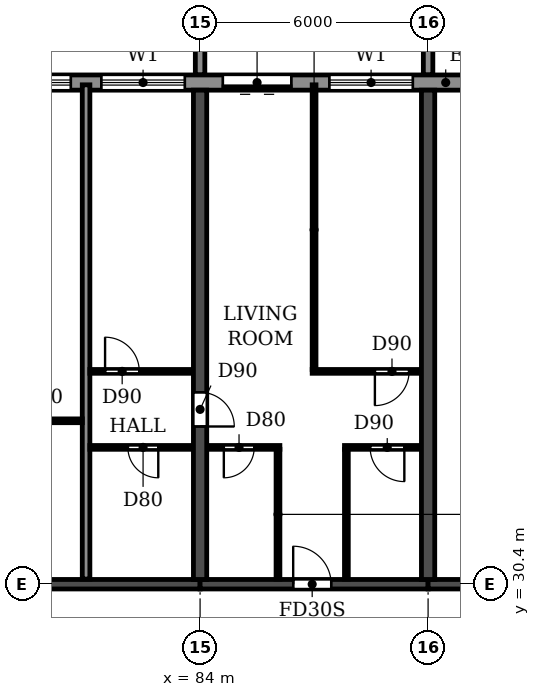
"""IFC4 building model, lengths in metres.
Left out: names, types, materials, properties, quantities, classifications, styles, units other than length and angle.
Written with IfcOpenShell. Run it as: python <this file> out.ifc"""

import sys

from ifc_helpers import new_model, si_unit, direction, frame, frame_2d, origin, place, context, subcontext, project, spatial, polyline, rectangle, outline, extrude, source, transform, mapped, element, fill, save


model = new_model("IFC4")
c1 = context("Model", 3, precision=1e-05, world=origin(), true_north=direction((0.0, 1.0)))
c2 = subcontext(c1, "Body", "Model", "MODEL_VIEW")
j1 = project(units=[si_unit("LENGTHUNIT", "METRE"), si_unit("PLANEANGLEUNIT", "RADIAN")], contexts=[c1])
p1 = place(None, origin())
s1 = spatial("IfcSite", under=j1, at=p1, CompositionType="ELEMENT")
p2 = place(p1, origin())
s2 = spatial("IfcBuilding", under=s1, at=p2, CompositionType="ELEMENT")
p3 = place(p2, frame((0.0, 0.0, 82.8)))
s3 = spatial("IfcBuildingStorey", under=s2, at=p3, CompositionType="ELEMENT", Elevation=82.8)
p4 = place(p3, frame((84.0, 30.525, 0.0), z_axis=(0.0, 0.0, 1.0), x_axis=(0.0, 1.0, 0.0)))
e1 = element("IfcWall", 1, at=p4, inside=s3, PredefinedType="SHEAR", context=c2, shape_type="SweptSolid", body=[
    extrude(rectangle(XDim=12.875, YDim=0.35, at=frame_2d((6.438, 0.0))), origin(), (0.0, 0.0, 1.0), 3.06),
])
p5 = place(p4, frame((4.025, 0.0, 0.0)))
e2 = element("IfcOpeningElement", 2, at=p5, cuts=e1, PredefinedType="OPENING", context=c2, shape_type="SweptSolid", body=[
    extrude(rectangle(XDim=0.9, YDim=2.1, at=frame_2d((0.45, 1.05))), frame((0.0, 0.185, 0.0), z_axis=(0.0, -1.0, 0.0), x_axis=(1.0, 0.0, 0.0)), (0.0, 0.0, 1.0), 0.37),
])
p6 = place(p3, frame((90.0, 30.525, 0.0), z_axis=(0.0, 0.0, 1.0), x_axis=(0.0, 1.0, 0.0)))
e3 = element("IfcWall", 3, at=p6, inside=s3, PredefinedType="SHEAR", context=c2, shape_type="SweptSolid", body=[
    extrude(rectangle(XDim=12.875, YDim=0.35, at=frame_2d((6.438, 0.0))), origin(), (0.0, 0.0, 1.0), 3.06),
])
p7 = place(p3, frame((78.0, 30.4, 0.0), z_axis=(0.0, 0.0, 1.0), x_axis=(1.0, 0.0, 0.0)))
e4 = element("IfcWall", 4, at=p7, inside=s3, PredefinedType="SHEAR", context=c2, shape_type="SweptSolid", body=[
    extrude(rectangle(XDim=6.0, YDim=0.25, at=frame_2d((3.0, 0.0))), origin(), (0.0, 0.0, 1.0), 2.46),
])
p8 = place(p3, frame((84.0, 30.4, 0.0), z_axis=(0.0, 0.0, 1.0), x_axis=(1.0, 0.0, 0.0)))
e5 = element("IfcWall", 5, at=p8, inside=s3, PredefinedType="SHEAR", context=c2, shape_type="SweptSolid", body=[
    extrude(rectangle(XDim=6.0, YDim=0.25, at=frame_2d((3.0, 0.0))), origin(), (0.0, 0.0, 1.0), 2.46),
])
p9 = place(p8, frame((2.45, 0.0, 0.0)))
e6 = element("IfcOpeningElement", 6, at=p9, cuts=e5, PredefinedType="OPENING", context=c2, shape_type="SweptSolid", body=[
    extrude(rectangle(XDim=1.0, YDim=2.1, at=frame_2d((0.5, 1.05))), frame((0.0, 0.135, 0.0), z_axis=(0.0, -1.0, 0.0), x_axis=(1.0, 0.0, 0.0)), (0.0, 0.0, 1.0), 0.27),
])
p10 = place(p3, frame((90.0, 30.4, 0.0), z_axis=(0.0, 0.0, 1.0), x_axis=(1.0, 0.0, 0.0)))
e7 = element("IfcWall", 7, at=p10, inside=s3, PredefinedType="SHEAR", context=c2, shape_type="SweptSolid", body=[
    extrude(rectangle(XDim=5.8, YDim=0.25, at=frame_2d((2.9, 0.0))), origin(), (0.0, 0.0, 1.0), 2.46),
])
p11 = place(p10, frame((2.5, 0.0, 0.0)))
e8 = element("IfcOpeningElement", 8, at=p11, cuts=e7, PredefinedType="OPENING", context=c2, shape_type="SweptSolid", body=[
    extrude(rectangle(XDim=1.0, YDim=2.1, at=frame_2d((0.5, 1.05))), frame((0.0, 0.135, 0.0), z_axis=(0.0, -1.0, 0.0), x_axis=(1.0, 0.0, 0.0)), (0.0, 0.0, 1.0), 0.27),
])
p12 = place(p3, frame((91.317, 43.6, 0.0), z_axis=(0.0, 0.0, 1.0), x_axis=(-1.0, 0.0, 0.0)))
e9 = element("IfcWall", 9, at=p12, inside=s3, PredefinedType="STANDARD", context=c2, shape_type="SweptSolid", body=[
    extrude(rectangle(XDim=80.634, YDim=0.4, at=frame_2d((40.317, 0.0))), origin(), (0.0, 0.0, 1.0), 3.06),
])
p13 = place(p12, frame((76.717, 0.0, 0.9)))
e10 = element("IfcOpeningElement", 10, at=p13, cuts=e9, PredefinedType="OPENING", context=c2, shape_type="SweptSolid", body=[
    extrude(rectangle(XDim=2.2, YDim=1.5, at=frame_2d((1.1, 0.75))), frame((0.0, 0.21, 0.0), z_axis=(0.0, -1.0, 0.0), x_axis=(1.0, 0.0, 0.0)), (0.0, 0.0, 1.0), 0.42),
])
p14 = place(p12, frame((73.917, 0.0, 0.0)))
e11 = element("IfcOpeningElement", 11, at=p14, cuts=e9, PredefinedType="OPENING", context=c2, shape_type="SweptSolid", body=[
    extrude(rectangle(XDim=1.8, YDim=2.4, at=frame_2d((0.9, 1.2))), frame((0.0, 0.21, 0.0), z_axis=(0.0, -1.0, 0.0), x_axis=(1.0, 0.0, 0.0)), (0.0, 0.0, 1.0), 0.42),
])
p15 = place(p12, frame((70.717, 0.0, 0.9)))
e12 = element("IfcOpeningElement", 12, at=p15, cuts=e9, PredefinedType="OPENING", context=c2, shape_type="SweptSolid", body=[
    extrude(rectangle(XDim=2.2, YDim=1.5, at=frame_2d((1.1, 0.75))), frame((0.0, 0.21, 0.0), z_axis=(0.0, -1.0, 0.0), x_axis=(1.0, 0.0, 0.0)), (0.0, 0.0, 1.0), 0.42),
])
p16 = place(p12, frame((67.717, 0.0, 0.9)))
e13 = element("IfcOpeningElement", 13, at=p16, cuts=e9, PredefinedType="OPENING", context=c2, shape_type="SweptSolid", body=[
    extrude(rectangle(XDim=2.2, YDim=1.5, at=frame_2d((1.1, 0.75))), frame((0.0, 0.21, 0.0), z_axis=(0.0, -1.0, 0.0), x_axis=(1.0, 0.0, 0.0)), (0.0, 0.0, 1.0), 0.42),
])
p17 = place(p12, frame((64.717, 0.0, 0.9)))
e14 = element("IfcOpeningElement", 14, at=p17, cuts=e9, PredefinedType="OPENING", context=c2, shape_type="SweptSolid", body=[
    extrude(rectangle(XDim=2.2, YDim=1.5, at=frame_2d((1.1, 0.75))), frame((0.0, 0.21, 0.0), z_axis=(0.0, -1.0, 0.0), x_axis=(1.0, 0.0, 0.0)), (0.0, 0.0, 1.0), 0.42),
])
p18 = place(p12, frame((61.917, 0.0, 0.0)))
e15 = element("IfcOpeningElement", 15, at=p18, cuts=e9, PredefinedType="OPENING", context=c2, shape_type="SweptSolid", body=[
    extrude(rectangle(XDim=1.8, YDim=2.4, at=frame_2d((0.9, 1.2))), frame((0.0, 0.21, 0.0), z_axis=(0.0, -1.0, 0.0), x_axis=(1.0, 0.0, 0.0)), (0.0, 0.0, 1.0), 0.42),
])
p19 = place(p12, frame((58.917, 0.0, 0.0)))
e16 = element("IfcOpeningElement", 16, at=p19, cuts=e9, PredefinedType="OPENING", context=c2, shape_type="SweptSolid", body=[
    extrude(rectangle(XDim=1.8, YDim=2.4, at=frame_2d((0.9, 1.2))), frame((0.0, 0.21, 0.0), z_axis=(0.0, -1.0, 0.0), x_axis=(1.0, 0.0, 0.0)), (0.0, 0.0, 1.0), 0.42),
])
p20 = place(p12, frame((55.717, 0.0, 0.9)))
e17 = element("IfcOpeningElement", 17, at=p20, cuts=e9, PredefinedType="OPENING", context=c2, shape_type="SweptSolid", body=[
    extrude(rectangle(XDim=2.2, YDim=1.5, at=frame_2d((1.1, 0.75))), frame((0.0, 0.21, 0.0), z_axis=(0.0, -1.0, 0.0), x_axis=(1.0, 0.0, 0.0)), (0.0, 0.0, 1.0), 0.42),
])
p21 = place(p12, frame((52.717, 0.0, 0.9)))
e18 = element("IfcOpeningElement", 18, at=p21, cuts=e9, PredefinedType="OPENING", context=c2, shape_type="SweptSolid", body=[
    extrude(rectangle(XDim=2.2, YDim=1.5, at=frame_2d((1.1, 0.75))), frame((0.0, 0.21, 0.0), z_axis=(0.0, -1.0, 0.0), x_axis=(1.0, 0.0, 0.0)), (0.0, 0.0, 1.0), 0.42),
])
p22 = place(p12, frame((49.917, 0.0, 0.0)))
e19 = element("IfcOpeningElement", 19, at=p22, cuts=e9, PredefinedType="OPENING", context=c2, shape_type="SweptSolid", body=[
    extrude(rectangle(XDim=1.8, YDim=2.4, at=frame_2d((0.9, 1.2))), frame((0.0, 0.21, 0.0), z_axis=(0.0, -1.0, 0.0), x_axis=(1.0, 0.0, 0.0)), (0.0, 0.0, 1.0), 0.42),
])
p23 = place(p12, frame((46.717, 0.0, 0.9)))
e20 = element("IfcOpeningElement", 20, at=p23, cuts=e9, PredefinedType="OPENING", context=c2, shape_type="SweptSolid", body=[
    extrude(rectangle(XDim=2.2, YDim=1.5, at=frame_2d((1.1, 0.75))), frame((0.0, 0.21, 0.0), z_axis=(0.0, -1.0, 0.0), x_axis=(1.0, 0.0, 0.0)), (0.0, 0.0, 1.0), 0.42),
])
p24 = place(p12, frame((43.717, 0.0, 0.9)))
e21 = element("IfcOpeningElement", 21, at=p24, cuts=e9, PredefinedType="OPENING", context=c2, shape_type="SweptSolid", body=[
    extrude(rectangle(XDim=2.2, YDim=1.5, at=frame_2d((1.1, 0.75))), frame((0.0, 0.21, 0.0), z_axis=(0.0, -1.0, 0.0), x_axis=(1.0, 0.0, 0.0)), (0.0, 0.0, 1.0), 0.42),
])
p25 = place(p12, frame((40.717, 0.0, 0.9)))
e22 = element("IfcOpeningElement", 22, at=p25, cuts=e9, PredefinedType="OPENING", context=c2, shape_type="SweptSolid", body=[
    extrude(rectangle(XDim=2.2, YDim=1.5, at=frame_2d((1.1, 0.75))), frame((0.0, 0.21, 0.0), z_axis=(0.0, -1.0, 0.0), x_axis=(1.0, 0.0, 0.0)), (0.0, 0.0, 1.0), 0.42),
])
p26 = place(p12, frame((37.917, 0.0, 0.0)))
e23 = element("IfcOpeningElement", 23, at=p26, cuts=e9, PredefinedType="OPENING", context=c2, shape_type="SweptSolid", body=[
    extrude(rectangle(XDim=1.8, YDim=2.4, at=frame_2d((0.9, 1.2))), frame((0.0, 0.21, 0.0), z_axis=(0.0, -1.0, 0.0), x_axis=(1.0, 0.0, 0.0)), (0.0, 0.0, 1.0), 0.42),
])
p27 = place(p12, frame((34.717, 0.0, 0.9)))
e24 = element("IfcOpeningElement", 24, at=p27, cuts=e9, PredefinedType="OPENING", context=c2, shape_type="SweptSolid", body=[
    extrude(rectangle(XDim=2.2, YDim=1.5, at=frame_2d((1.1, 0.75))), frame((0.0, 0.21, 0.0), z_axis=(0.0, -1.0, 0.0), x_axis=(1.0, 0.0, 0.0)), (0.0, 0.0, 1.0), 0.42),
])
p28 = place(p12, frame((31.717, 0.0, 0.9)))
e25 = element("IfcOpeningElement", 25, at=p28, cuts=e9, PredefinedType="OPENING", context=c2, shape_type="SweptSolid", body=[
    extrude(rectangle(XDim=2.2, YDim=1.5, at=frame_2d((1.1, 0.75))), frame((0.0, 0.21, 0.0), z_axis=(0.0, -1.0, 0.0), x_axis=(1.0, 0.0, 0.0)), (0.0, 0.0, 1.0), 0.42),
])
p29 = place(p12, frame((28.917, 0.0, 0.0)))
e26 = element("IfcOpeningElement", 26, at=p29, cuts=e9, PredefinedType="OPENING", context=c2, shape_type="SweptSolid", body=[
    extrude(rectangle(XDim=1.8, YDim=2.4, at=frame_2d((0.9, 1.2))), frame((0.0, 0.21, 0.0), z_axis=(0.0, -1.0, 0.0), x_axis=(1.0, 0.0, 0.0)), (0.0, 0.0, 1.0), 0.42),
])
p30 = place(p12, frame((25.717, 0.0, 0.9)))
e27 = element("IfcOpeningElement", 27, at=p30, cuts=e9, PredefinedType="OPENING", context=c2, shape_type="SweptSolid", body=[
    extrude(rectangle(XDim=2.2, YDim=1.5, at=frame_2d((1.1, 0.75))), frame((0.0, 0.21, 0.0), z_axis=(0.0, -1.0, 0.0), x_axis=(1.0, 0.0, 0.0)), (0.0, 0.0, 1.0), 0.42),
])
p31 = place(p12, frame((22.717, 0.0, 0.9)))
e28 = element("IfcOpeningElement", 28, at=p31, cuts=e9, PredefinedType="OPENING", context=c2, shape_type="SweptSolid", body=[
    extrude(rectangle(XDim=2.2, YDim=1.5, at=frame_2d((1.1, 0.75))), frame((0.0, 0.21, 0.0), z_axis=(0.0, -1.0, 0.0), x_axis=(1.0, 0.0, 0.0)), (0.0, 0.0, 1.0), 0.42),
])
p32 = place(p12, frame((19.717, 0.0, 0.9)))
e29 = element("IfcOpeningElement", 29, at=p32, cuts=e9, PredefinedType="OPENING", context=c2, shape_type="SweptSolid", body=[
    extrude(rectangle(XDim=2.2, YDim=1.5, at=frame_2d((1.1, 0.75))), frame((0.0, 0.21, 0.0), z_axis=(0.0, -1.0, 0.0), x_axis=(1.0, 0.0, 0.0)), (0.0, 0.0, 1.0), 0.42),
])
p33 = place(p12, frame((16.717, 0.0, 0.9)))
e30 = element("IfcOpeningElement", 30, at=p33, cuts=e9, PredefinedType="OPENING", context=c2, shape_type="SweptSolid", body=[
    extrude(rectangle(XDim=2.2, YDim=1.5, at=frame_2d((1.1, 0.75))), frame((0.0, 0.21, 0.0), z_axis=(0.0, -1.0, 0.0), x_axis=(1.0, 0.0, 0.0)), (0.0, 0.0, 1.0), 0.42),
])
p34 = place(p12, frame((13.917, 0.0, 0.0)))
e31 = element("IfcOpeningElement", 31, at=p34, cuts=e9, PredefinedType="OPENING", context=c2, shape_type="SweptSolid", body=[
    extrude(rectangle(XDim=1.8, YDim=2.4, at=frame_2d((0.9, 1.2))), frame((0.0, 0.21, 0.0), z_axis=(0.0, -1.0, 0.0), x_axis=(1.0, 0.0, 0.0)), (0.0, 0.0, 1.0), 0.42),
])
p35 = place(p12, frame((10.717, 0.0, 0.9)))
e32 = element("IfcOpeningElement", 32, at=p35, cuts=e9, PredefinedType="OPENING", context=c2, shape_type="SweptSolid", body=[
    extrude(rectangle(XDim=2.2, YDim=1.5, at=frame_2d((1.1, 0.75))), frame((0.0, 0.21, 0.0), z_axis=(0.0, -1.0, 0.0), x_axis=(1.0, 0.0, 0.0)), (0.0, 0.0, 1.0), 0.42),
])
p36 = place(p12, frame((7.717, 0.0, 0.9)))
e33 = element("IfcOpeningElement", 33, at=p36, cuts=e9, PredefinedType="OPENING", context=c2, shape_type="SweptSolid", body=[
    extrude(rectangle(XDim=2.2, YDim=1.5, at=frame_2d((1.1, 0.75))), frame((0.0, 0.21, 0.0), z_axis=(0.0, -1.0, 0.0), x_axis=(1.0, 0.0, 0.0)), (0.0, 0.0, 1.0), 0.42),
])
p37 = place(p12, frame((4.917, 0.0, 0.0)))
e34 = element("IfcOpeningElement", 34, at=p37, cuts=e9, PredefinedType="OPENING", context=c2, shape_type="SweptSolid", body=[
    extrude(rectangle(XDim=1.8, YDim=2.4, at=frame_2d((0.9, 1.2))), frame((0.0, 0.21, 0.0), z_axis=(0.0, -1.0, 0.0), x_axis=(1.0, 0.0, 0.0)), (0.0, 0.0, 1.0), 0.42),
])
p38 = place(p12, frame((1.717, 0.0, 0.9)))
e35 = element("IfcOpeningElement", 35, at=p38, cuts=e9, PredefinedType="OPENING", context=c2, shape_type="SweptSolid", body=[
    extrude(rectangle(XDim=2.2, YDim=1.5, at=frame_2d((1.1, 0.75))), frame((0.0, 0.21, 0.0), z_axis=(0.0, -1.0, 0.0), x_axis=(1.0, 0.0, 0.0)), (0.0, 0.0, 1.0), 0.42),
])
m1 = source(origin(), c2, "Body", "SweptSolid", [
    extrude(outline(polyline([(0.0, 0.0), (0.25, 0.0), (0.25, 3.1), (0.0, 3.1), (0.0, 0.0)])), origin(), (0.0, 0.0, 1.0), 3.1),
])
for number, where in (
    (36, (83.875, 43.8, 0.0)),
    (37, (89.875, 43.8, 0.0)),
):
    element("IfcWall", number, at=place(p3, frame(where)), inside=s3, PredefinedType="STANDARD", context=c2, shape_type="MappedRepresentation", body=[
        mapped(m1, transform((0.0, 0.0, 0.0))),
    ])
p39 = place(p3, frame((81.0, 30.535, 0.0), z_axis=(0.0, 0.0, 1.0), x_axis=(0.0, 1.0, 0.0)))
e38 = element("IfcWall", 38, at=p39, inside=s3, PredefinedType="PARTITIONING", context=c2, shape_type="SweptSolid", body=[
    extrude(rectangle(XDim=13.005, YDim=0.2, at=frame_2d((6.502, 0.0))), origin(), (0.0, 0.0, 1.0), 3.06),
])
p40 = place(p3, frame((81.1, 34.0, 0.0), z_axis=(0.0, 0.0, 1.0), x_axis=(1.0, 0.0, 0.0)))
e39 = element("IfcWall", 39, at=p40, inside=s3, PredefinedType="PARTITIONING", context=c2, shape_type="SweptSolid", body=[
    extrude(rectangle(XDim=2.715, YDim=0.1, at=frame_2d((1.357, 0.0))), origin(), (0.0, 0.0, 1.0), 3.06),
])
p41 = place(p40, frame((1.0, 0.0, 0.0)))
e40 = element("IfcOpeningElement", 40, at=p41, cuts=e39, PredefinedType="OPENING", context=c2, shape_type="SweptSolid", body=[
    extrude(rectangle(XDim=0.8, YDim=2.1, at=frame_2d((0.4, 1.05))), frame((0.0, 0.06, 0.0), z_axis=(0.0, -1.0, 0.0), x_axis=(1.0, 0.0, 0.0)), (0.0, 0.0, 1.0), 0.12),
])
p42 = place(p3, frame((84.185, 34.0, 0.0), z_axis=(0.0, 0.0, 1.0), x_axis=(1.0, 0.0, 0.0)))
e41 = element("IfcWall", 41, at=p42, inside=s3, PredefinedType="PARTITIONING", context=c2, shape_type="SweptSolid", body=[
    extrude(rectangle(XDim=1.915, YDim=0.1, at=frame_2d((0.958, 0.0))), origin(), (0.0, 0.0, 1.0), 3.06),
])
p43 = place(p42, frame((0.44, 0.0, 0.0)))
e42 = element("IfcOpeningElement", 42, at=p43, cuts=e41, PredefinedType="OPENING", context=c2, shape_type="SweptSolid", body=[
    extrude(rectangle(XDim=0.8, YDim=2.1, at=frame_2d((0.4, 1.05))), frame((0.0, 0.06, 0.0), z_axis=(0.0, -1.0, 0.0), x_axis=(1.0, 0.0, 0.0)), (0.0, 0.0, 1.0), 0.12),
])
p44 = place(p3, frame((87.8, 34.0, 0.0), z_axis=(0.0, 0.0, 1.0), x_axis=(1.0, 0.0, 0.0)))
e43 = element("IfcWall", 43, at=p44, inside=s3, PredefinedType="PARTITIONING", context=c2, shape_type="SweptSolid", body=[
    extrude(rectangle(XDim=2.015, YDim=0.1, at=frame_2d((1.007, 0.0))), origin(), (0.0, 0.0, 1.0), 3.06),
])
p45 = place(p44, frame((0.675, 0.0, 0.0)))
e44 = element("IfcOpeningElement", 44, at=p45, cuts=e43, PredefinedType="OPENING", context=c2, shape_type="SweptSolid", body=[
    extrude(rectangle(XDim=0.9, YDim=2.1, at=frame_2d((0.45, 1.05))), frame((0.0, 0.06, 0.0), z_axis=(0.0, -1.0, 0.0), x_axis=(1.0, 0.0, 0.0)), (0.0, 0.0, 1.0), 0.12),
])
p46 = place(p3, frame((78.185, 34.7, 0.0), z_axis=(0.0, 0.0, 1.0), x_axis=(1.0, 0.0, 0.0)))
e45 = element("IfcWall", 45, at=p46, inside=s3, PredefinedType="PARTITIONING", context=c2, shape_type="SweptSolid", body=[
    extrude(rectangle(XDim=2.715, YDim=0.1, at=frame_2d((1.357, 0.0))), origin(), (0.0, 0.0, 1.0), 3.06),
])
p47 = place(p46, frame((0.915, 0.0, 0.0)))
e46 = element("IfcOpeningElement", 46, at=p47, cuts=e45, PredefinedType="OPENING", context=c2, shape_type="SweptSolid", body=[
    extrude(rectangle(XDim=0.8, YDim=2.1, at=frame_2d((0.4, 1.05))), frame((0.0, 0.06, 0.0), z_axis=(0.0, -1.0, 0.0), x_axis=(1.0, 0.0, 0.0)), (0.0, 0.0, 1.0), 0.12),
])
p48 = place(p3, frame((81.1, 36.0, 0.0), z_axis=(0.0, 0.0, 1.0), x_axis=(1.0, 0.0, 0.0)))
e47 = element("IfcWall", 47, at=p48, inside=s3, PredefinedType="PARTITIONING", context=c2, shape_type="SweptSolid", body=[
    extrude(rectangle(XDim=2.715, YDim=0.1, at=frame_2d((1.357, 0.0))), origin(), (0.0, 0.0, 1.0), 3.06),
])
p49 = place(p48, frame((0.4, 0.0, 0.0)))
e48 = element("IfcOpeningElement", 48, at=p49, cuts=e47, PredefinedType="OPENING", context=c2, shape_type="SweptSolid", body=[
    extrude(rectangle(XDim=0.9, YDim=2.1, at=frame_2d((0.45, 1.05))), frame((0.0, 0.06, 0.0), z_axis=(0.0, -1.0, 0.0), x_axis=(1.0, 0.0, 0.0)), (0.0, 0.0, 1.0), 0.12),
])
p50 = place(p3, frame((86.95, 36.0, 0.0), z_axis=(0.0, 0.0, 1.0), x_axis=(1.0, 0.0, 0.0)))
e49 = element("IfcWall", 49, at=p50, inside=s3, PredefinedType="PARTITIONING", context=c2, shape_type="SweptSolid", body=[
    extrude(rectangle(XDim=2.865, YDim=0.1, at=frame_2d((1.433, 0.0))), origin(), (0.0, 0.0, 1.0), 3.06),
])
p51 = place(p50, frame((1.65, 0.0, 0.0)))
e50 = element("IfcOpeningElement", 50, at=p51, cuts=e49, PredefinedType="OPENING", context=c2, shape_type="SweptSolid", body=[
    extrude(rectangle(XDim=0.9, YDim=2.1, at=frame_2d((0.45, 1.05))), frame((0.0, 0.06, 0.0), z_axis=(0.0, -1.0, 0.0), x_axis=(1.0, 0.0, 0.0)), (0.0, 0.0, 1.0), 0.12),
])
p52 = place(p3, frame((86.05, 30.535, 0.0), z_axis=(0.0, 0.0, 1.0), x_axis=(0.0, 1.0, 0.0)))
e51 = element("IfcWall", 51, at=p52, inside=s3, PredefinedType="PARTITIONING", context=c2, shape_type="SweptSolid", body=[
    extrude(rectangle(XDim=3.415, YDim=0.1, at=frame_2d((1.708, 0.0))), origin(), (0.0, 0.0, 1.0), 3.06),
])
p53 = place(p3, frame((87.0, 36.05, 0.0), z_axis=(0.0, 0.0, 1.0), x_axis=(0.0, 1.0, 0.0)))
e52 = element("IfcWall", 52, at=p53, inside=s3, PredefinedType="PARTITIONING", context=c2, shape_type="SweptSolid", body=[
    extrude(rectangle(XDim=7.49, YDim=0.1, at=frame_2d((3.745, 0.0))), origin(), (0.0, 0.0, 1.0), 3.06),
])
p54 = place(p3, frame((87.85, 30.535, 0.0), z_axis=(0.0, 0.0, 1.0), x_axis=(0.0, 1.0, 0.0)))
e53 = element("IfcWall", 53, at=p54, inside=s3, PredefinedType="PARTITIONING", context=c2, shape_type="SweptSolid", body=[
    extrude(rectangle(XDim=3.415, YDim=0.1, at=frame_2d((1.708, 0.0))), origin(), (0.0, 0.0, 1.0), 3.06),
])
p55 = place(p35, origin())
e54 = element("IfcWindow", 54, at=p55, inside=s3, PartitioningType="DOUBLE_PANEL_HORIZONTAL", PredefinedType="WINDOW", context=c2, shape_type="SweptSolid", body=[
    extrude(rectangle(XDim=2.2, YDim=1.5, at=frame_2d((1.1, 0.75))), frame((0.0, 0.03, 0.0), z_axis=(0.0, -1.0, 0.0), x_axis=(1.0, 0.0, 0.0)), (0.0, 0.0, 1.0), 0.06),
])
fill(e32, e54)
p56 = place(p36, origin())
e55 = element("IfcWindow", 55, at=p56, inside=s3, PartitioningType="DOUBLE_PANEL_HORIZONTAL", PredefinedType="WINDOW", context=c2, shape_type="SweptSolid", body=[
    extrude(rectangle(XDim=2.2, YDim=1.5, at=frame_2d((1.1, 0.75))), frame((0.0, 0.03, 0.0), z_axis=(0.0, -1.0, 0.0), x_axis=(1.0, 0.0, 0.0)), (0.0, 0.0, 1.0), 0.06),
])
fill(e33, e55)
p57 = place(p37, origin())
e56 = element("IfcDoor", 56, at=p57, inside=s3, OperationType="DOUBLE_DOOR_SLIDING", PredefinedType="DOOR", context=c2, shape_type="SweptSolid", body=[
    extrude(rectangle(XDim=1.8, YDim=2.4, at=frame_2d((0.9, 1.2))), frame((0.0, 0.025, 0.0), z_axis=(0.0, -1.0, 0.0), x_axis=(1.0, 0.0, 0.0)), (0.0, 0.0, 1.0), 0.05),
])
fill(e34, e56)
p58 = place(p38, origin())
e57 = element("IfcWindow", 57, at=p58, inside=s3, PartitioningType="DOUBLE_PANEL_HORIZONTAL", PredefinedType="WINDOW", context=c2, shape_type="SweptSolid", body=[
    extrude(rectangle(XDim=2.2, YDim=1.5, at=frame_2d((1.1, 0.75))), frame((0.0, 0.03, 0.0), z_axis=(0.0, -1.0, 0.0), x_axis=(1.0, 0.0, 0.0)), (0.0, 0.0, 1.0), 0.06),
])
fill(e35, e57)
p59 = place(p49, origin())
e58 = element("IfcDoor", 58, at=p59, inside=s3, OperationType="SINGLE_SWING_LEFT", PredefinedType="DOOR", context=c2, shape_type="SweptSolid", body=[
    extrude(rectangle(XDim=0.9, YDim=2.1, at=frame_2d((0.45, 1.05))), frame((0.0, 0.025, 0.0), z_axis=(0.0, -1.0, 0.0), x_axis=(1.0, 0.0, 0.0)), (0.0, 0.0, 1.0), 0.05),
])
fill(e48, e58)
p60 = place(p41, frame((0.8, 0.0, 0.0), z_axis=(0.0, 0.0, 1.0), x_axis=(-1.0, 0.0, 0.0)))
e59 = element("IfcDoor", 59, at=p60, inside=s3, OperationType="SINGLE_SWING_LEFT", PredefinedType="DOOR", context=c2, shape_type="SweptSolid", body=[
    extrude(rectangle(XDim=0.8, YDim=2.1, at=frame_2d((0.4, 1.05))), frame((0.0, 0.025, 0.0), z_axis=(0.0, -1.0, 0.0), x_axis=(1.0, 0.0, 0.0)), (0.0, 0.0, 1.0), 0.05),
])
fill(e40, e59)
p61 = place(p5, frame((0.9, 0.0, 0.0), z_axis=(0.0, 0.0, 1.0), x_axis=(-1.0, 0.0, 0.0)))
e60 = element("IfcDoor", 60, at=p61, inside=s3, OperationType="SINGLE_SWING_RIGHT", PredefinedType="DOOR", context=c2, shape_type="SweptSolid", body=[
    extrude(rectangle(XDim=0.9, YDim=2.1, at=frame_2d((0.45, 1.05))), frame((0.0, 0.025, 0.0), z_axis=(0.0, -1.0, 0.0), x_axis=(1.0, 0.0, 0.0)), (0.0, 0.0, 1.0), 0.05),
])
fill(e2, e60)
p62 = place(p43, frame((0.8, 0.0, 0.0), z_axis=(0.0, 0.0, 1.0), x_axis=(-1.0, 0.0, 0.0)))
e61 = element("IfcDoor", 61, at=p62, inside=s3, OperationType="SINGLE_SWING_RIGHT", PredefinedType="DOOR", context=c2, shape_type="SweptSolid", body=[
    extrude(rectangle(XDim=0.8, YDim=2.1, at=frame_2d((0.4, 1.05))), frame((0.0, 0.025, 0.0), z_axis=(0.0, -1.0, 0.0), x_axis=(1.0, 0.0, 0.0)), (0.0, 0.0, 1.0), 0.05),
])
fill(e42, e61)
p63 = place(p9, origin())
e62 = element("IfcDoor", 62, at=p63, inside=s3, OperationType="SINGLE_SWING_LEFT", PredefinedType="DOOR", context=c2, shape_type="SweptSolid", body=[
    extrude(rectangle(XDim=1.0, YDim=2.1, at=frame_2d((0.5, 1.05))), frame((0.0, 0.025, 0.0), z_axis=(0.0, -1.0, 0.0), x_axis=(1.0, 0.0, 0.0)), (0.0, 0.0, 1.0), 0.05),
])
fill(e6, e62)
p64 = place(p45, frame((0.9, 0.0, 0.0), z_axis=(0.0, 0.0, 1.0), x_axis=(-1.0, 0.0, 0.0)))
e63 = element("IfcDoor", 63, at=p64, inside=s3, OperationType="SINGLE_SWING_LEFT", PredefinedType="DOOR", context=c2, shape_type="SweptSolid", body=[
    extrude(rectangle(XDim=0.9, YDim=2.1, at=frame_2d((0.45, 1.05))), frame((0.0, 0.025, 0.0), z_axis=(0.0, -1.0, 0.0), x_axis=(1.0, 0.0, 0.0)), (0.0, 0.0, 1.0), 0.05),
])
fill(e44, e63)
p65 = place(p51, frame((0.9, 0.0, 0.0), z_axis=(0.0, 0.0, 1.0), x_axis=(-1.0, 0.0, 0.0)))
e64 = element("IfcDoor", 64, at=p65, inside=s3, OperationType="SINGLE_SWING_RIGHT", PredefinedType="DOOR", context=c2, shape_type="SweptSolid", body=[
    extrude(rectangle(XDim=0.9, YDim=2.1, at=frame_2d((0.45, 1.05))), frame((0.0, 0.025, 0.0), z_axis=(0.0, -1.0, 0.0), x_axis=(1.0, 0.0, 0.0)), (0.0, 0.0, 1.0), 0.05),
])
fill(e50, e64)
save(model, sys.argv[1])
